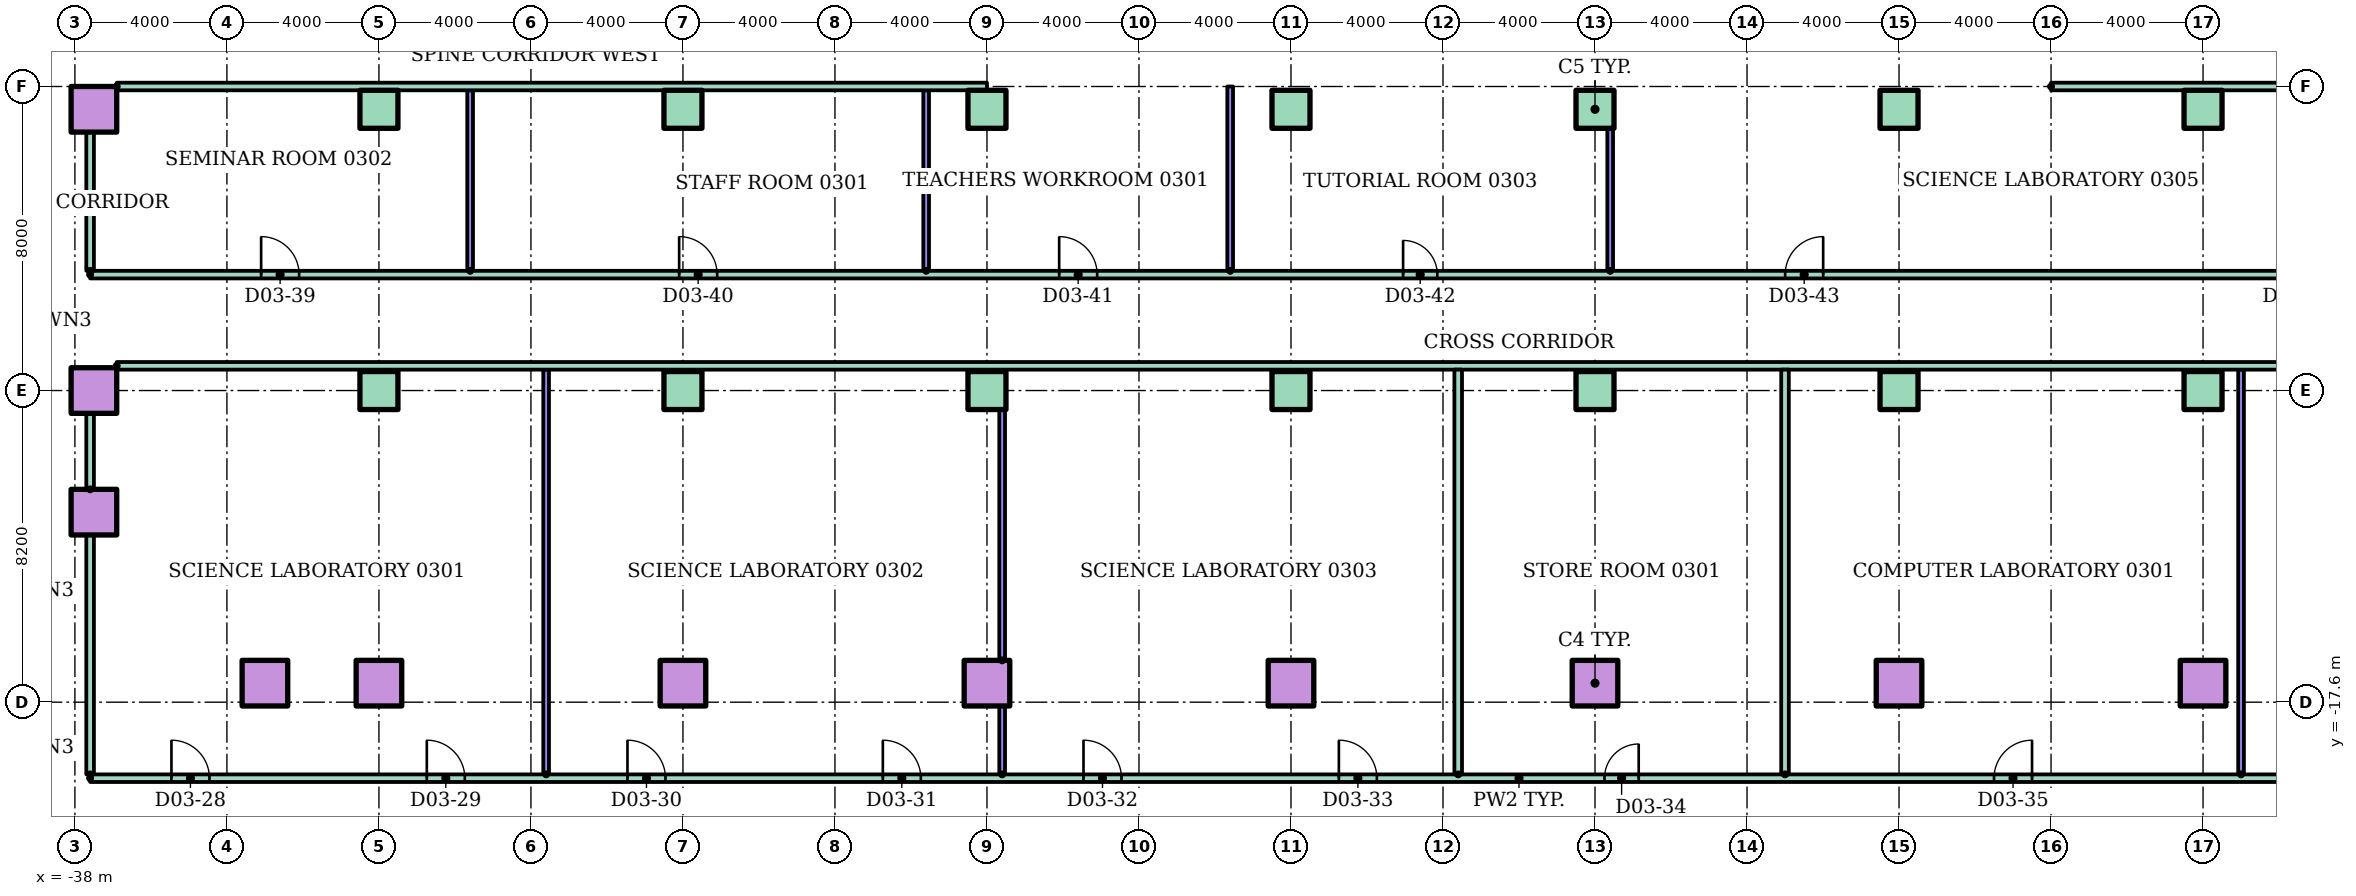
"""IFC4 building model, lengths in metres.
Left out: names, types, materials, properties, quantities, classifications, styles, units other than length and angle.
Written with IfcOpenShell. Run it as: python <this file> out.ifc"""

import sys

from ifc_helpers import new_model, si_unit, direction, frame, frame_2d, origin, origin_2d, place, context, subcontext, project, spatial, rectangle, hollow_rectangle, extrude, element, fill, save


model = new_model("IFC4")
c1 = context("Model", 3, precision=1e-05, world=origin(), true_north=direction((0.0, 1.0)))
c2 = subcontext(c1, "Body", "Model", "MODEL_VIEW")
j1 = project(units=[si_unit("LENGTHUNIT", "METRE"), si_unit("PLANEANGLEUNIT", "RADIAN")], contexts=[c1])
p1 = place(None, origin())
s1 = spatial("IfcSite", under=j1, at=p1, CompositionType="ELEMENT")
p2 = place(p1, origin())
s2 = spatial("IfcBuilding", under=s1, at=p2, CompositionType="ELEMENT")
p3 = place(p2, frame((0.0, 0.0, 14.0)))
s3 = spatial("IfcBuildingStorey", under=s2, at=p3, CompositionType="ELEMENT", Elevation=14.0)
for number, where in (
    (1, (-33.0, -17.1, 0.0)),
    (2, (-30.0, -17.1, 0.0)),
    (3, (-22.0, -17.1, 0.0)),
    (4, (-14.0, -17.1, 0.0)),
    (5, (-6.0, -17.1, 0.0)),
    (6, (2.0, -17.1, 0.0)),
    (7, (10.0, -17.1, 0.0)),
    (8, (18.0, -17.1, 0.0)),
    (9, (-37.5, -12.6, 0.0)),
    (10, (-37.5, -9.4, 0.0)),
):
    element("IfcColumn", number, at=place(p3, frame(where)), inside=s3, PredefinedType="COLUMN", context=c2, shape_type="SweptSolid", body=[
        extrude(hollow_rectangle(XDim=1.2, YDim=1.2, WallThickness=0.06, at=origin_2d()), origin(), (0.0, 0.0, 1.0), 4.0),
    ])
for number, where in (
    (11, (-30.0, -9.4, 0.0)),
    (12, (-22.0, -9.4, 0.0)),
    (13, (-14.0, -9.4, 0.0)),
    (14, (-6.0, -9.4, 0.0)),
    (15, (2.0, -9.4, 0.0)),
    (16, (10.0, -9.4, 0.0)),
    (17, (18.0, -9.4, 0.0)),
):
    element("IfcColumn", number, at=place(p3, frame(where)), inside=s3, PredefinedType="COLUMN", context=c2, shape_type="SweptSolid", body=[
        extrude(rectangle(XDim=1.0, YDim=1.0, at=origin_2d()), origin(), (0.0, 0.0, 1.0), 4.0),
    ])
p4 = place(p3, frame((-37.5, -2.0, 0.0)))
e18 = element("IfcColumn", 18, at=p4, inside=s3, PredefinedType="COLUMN", context=c2, shape_type="SweptSolid", body=[
    extrude(hollow_rectangle(XDim=1.2, YDim=1.2, WallThickness=0.06, at=origin_2d()), origin(), (0.0, 0.0, 1.0), 4.0),
])
for number, where in (
    (19, (-30.0, -2.0, 0.0)),
    (20, (-22.0, -2.0, 0.0)),
    (21, (-14.0, -2.0, 0.0)),
    (22, (-6.0, -2.0, 0.0)),
    (23, (2.0, -2.0, 0.0)),
    (24, (10.0, -2.0, 0.0)),
    (25, (18.0, -2.0, 0.0)),
):
    element("IfcColumn", number, at=place(p3, frame(where)), inside=s3, PredefinedType="COLUMN", context=c2, shape_type="SweptSolid", body=[
        extrude(rectangle(XDim=1.0, YDim=1.0, at=origin_2d()), origin(), (0.0, 0.0, 1.0), 4.0),
    ])
p5 = place(p3, frame((-37.6, -19.6, 0.0)))
e26 = element("IfcWall", 26, at=p5, inside=s3, PredefinedType="PARTITIONING", context=c2, shape_type="SweptSolid", body=[
    extrude(rectangle(XDim=75.2, YDim=0.2, at=frame_2d((37.6, 0.0))), origin(), (0.0, 0.0, 1.0), 3.7),
])
p6 = place(p5, frame((2.14, 0.0, 0.0)))
e27 = element("IfcOpeningElement", 27, at=p6, cuts=e26, PredefinedType="OPENING", context=c2, shape_type="SweptSolid", body=[
    extrude(rectangle(XDim=1.0, YDim=2.1, at=frame_2d((0.5, 1.05))), frame((0.0, 0.11, 0.0), z_axis=(0.0, -1.0, 0.0), x_axis=(1.0, 0.0, 0.0)), (0.0, 0.0, 1.0), 0.22),
])
p7 = place(p5, frame((8.86, 0.0, 0.0)))
e28 = element("IfcOpeningElement", 28, at=p7, cuts=e26, PredefinedType="OPENING", context=c2, shape_type="SweptSolid", body=[
    extrude(rectangle(XDim=1.0, YDim=2.1, at=frame_2d((0.5, 1.05))), frame((0.0, 0.11, 0.0), z_axis=(0.0, -1.0, 0.0), x_axis=(1.0, 0.0, 0.0)), (0.0, 0.0, 1.0), 0.22),
])
p8 = place(p5, frame((14.14, 0.0, 0.0)))
e29 = element("IfcOpeningElement", 29, at=p8, cuts=e26, PredefinedType="OPENING", context=c2, shape_type="SweptSolid", body=[
    extrude(rectangle(XDim=1.0, YDim=2.1, at=frame_2d((0.5, 1.05))), frame((0.0, 0.11, 0.0), z_axis=(0.0, -1.0, 0.0), x_axis=(1.0, 0.0, 0.0)), (0.0, 0.0, 1.0), 0.22),
])
p9 = place(p5, frame((20.86, 0.0, 0.0)))
e30 = element("IfcOpeningElement", 30, at=p9, cuts=e26, PredefinedType="OPENING", context=c2, shape_type="SweptSolid", body=[
    extrude(rectangle(XDim=1.0, YDim=2.1, at=frame_2d((0.5, 1.05))), frame((0.0, 0.11, 0.0), z_axis=(0.0, -1.0, 0.0), x_axis=(1.0, 0.0, 0.0)), (0.0, 0.0, 1.0), 0.22),
])
p10 = place(p5, frame((26.14, 0.0, 0.0)))
e31 = element("IfcOpeningElement", 31, at=p10, cuts=e26, PredefinedType="OPENING", context=c2, shape_type="SweptSolid", body=[
    extrude(rectangle(XDim=1.0, YDim=2.1, at=frame_2d((0.5, 1.05))), frame((0.0, 0.11, 0.0), z_axis=(0.0, -1.0, 0.0), x_axis=(1.0, 0.0, 0.0)), (0.0, 0.0, 1.0), 0.22),
])
p11 = place(p5, frame((32.86, 0.0, 0.0)))
e32 = element("IfcOpeningElement", 32, at=p11, cuts=e26, PredefinedType="OPENING", context=c2, shape_type="SweptSolid", body=[
    extrude(rectangle(XDim=1.0, YDim=2.1, at=frame_2d((0.5, 1.05))), frame((0.0, 0.11, 0.0), z_axis=(0.0, -1.0, 0.0), x_axis=(1.0, 0.0, 0.0)), (0.0, 0.0, 1.0), 0.22),
])
p12 = place(p5, frame((39.85, 0.0, 0.0)))
e33 = element("IfcOpeningElement", 33, at=p12, cuts=e26, PredefinedType="OPENING", context=c2, shape_type="SweptSolid", body=[
    extrude(rectangle(XDim=0.9, YDim=2.1, at=frame_2d((0.45, 1.05))), frame((0.0, 0.11, 0.0), z_axis=(0.0, -1.0, 0.0), x_axis=(1.0, 0.0, 0.0)), (0.0, 0.0, 1.0), 0.22),
])
p13 = place(p5, frame((50.1, 0.0, 0.0)))
e34 = element("IfcOpeningElement", 34, at=p13, cuts=e26, PredefinedType="OPENING", context=c2, shape_type="SweptSolid", body=[
    extrude(rectangle(XDim=1.0, YDim=2.1, at=frame_2d((0.5, 1.05))), frame((0.0, 0.11, 0.0), z_axis=(0.0, -1.0, 0.0), x_axis=(1.0, 0.0, 0.0)), (0.0, 0.0, 1.0), 0.22),
])
p14 = place(p5, frame((61.1, 0.0, 0.0)))
e35 = element("IfcOpeningElement", 35, at=p14, cuts=e26, PredefinedType="OPENING", context=c2, shape_type="SweptSolid", body=[
    extrude(rectangle(XDim=1.0, YDim=2.1, at=frame_2d((0.5, 1.05))), frame((0.0, 0.11, 0.0), z_axis=(0.0, -1.0, 0.0), x_axis=(1.0, 0.0, 0.0)), (0.0, 0.0, 1.0), 0.22),
])
p15 = place(p3, frame((-36.9, -8.75, 0.0)))
e36 = element("IfcWall", 36, at=p15, inside=s3, PredefinedType="PARTITIONING", context=c2, shape_type="SweptSolid", body=[
    extrude(rectangle(XDim=73.8, YDim=0.2, at=frame_2d((36.9, 0.0))), origin(), (0.0, 0.0, 1.0), 3.7),
])
p16 = place(p3, frame((-37.6, -6.35, 0.0)))
e37 = element("IfcWall", 37, at=p16, inside=s3, PredefinedType="PARTITIONING", context=c2, shape_type="SweptSolid", body=[
    extrude(rectangle(XDim=75.2, YDim=0.2, at=frame_2d((37.6, 0.0))), origin(), (0.0, 0.0, 1.0), 3.7),
])
p17 = place(p16, frame((4.5, 0.0, 0.0)))
e38 = element("IfcOpeningElement", 38, at=p17, cuts=e37, PredefinedType="OPENING", context=c2, shape_type="SweptSolid", body=[
    extrude(rectangle(XDim=1.0, YDim=2.1, at=frame_2d((0.5, 1.05))), frame((0.0, 0.11, 0.0), z_axis=(0.0, -1.0, 0.0), x_axis=(1.0, 0.0, 0.0)), (0.0, 0.0, 1.0), 0.22),
])
p18 = place(p16, frame((15.5, 0.0, 0.0)))
e39 = element("IfcOpeningElement", 39, at=p18, cuts=e37, PredefinedType="OPENING", context=c2, shape_type="SweptSolid", body=[
    extrude(rectangle(XDim=1.0, YDim=2.1, at=frame_2d((0.5, 1.05))), frame((0.0, 0.11, 0.0), z_axis=(0.0, -1.0, 0.0), x_axis=(1.0, 0.0, 0.0)), (0.0, 0.0, 1.0), 0.22),
])
p19 = place(p16, frame((25.5, 0.0, 0.0)))
e40 = element("IfcOpeningElement", 40, at=p19, cuts=e37, PredefinedType="OPENING", context=c2, shape_type="SweptSolid", body=[
    extrude(rectangle(XDim=1.0, YDim=2.1, at=frame_2d((0.5, 1.05))), frame((0.0, 0.11, 0.0), z_axis=(0.0, -1.0, 0.0), x_axis=(1.0, 0.0, 0.0)), (0.0, 0.0, 1.0), 0.22),
])
p20 = place(p16, frame((34.55, 0.0, 0.0)))
e41 = element("IfcOpeningElement", 41, at=p20, cuts=e37, PredefinedType="OPENING", context=c2, shape_type="SweptSolid", body=[
    extrude(rectangle(XDim=0.9, YDim=2.1, at=frame_2d((0.45, 1.05))), frame((0.0, 0.11, 0.0), z_axis=(0.0, -1.0, 0.0), x_axis=(1.0, 0.0, 0.0)), (0.0, 0.0, 1.0), 0.22),
])
p21 = place(p16, frame((44.604, 0.0, 0.0)))
e42 = element("IfcOpeningElement", 42, at=p21, cuts=e37, PredefinedType="OPENING", context=c2, shape_type="SweptSolid", body=[
    extrude(rectangle(XDim=1.0, YDim=2.1, at=frame_2d((0.5, 1.05))), frame((0.0, 0.11, 0.0), z_axis=(0.0, -1.0, 0.0), x_axis=(1.0, 0.0, 0.0)), (0.0, 0.0, 1.0), 0.22),
])
p22 = place(p16, frame((57.596, 0.0, 0.0)))
e43 = element("IfcOpeningElement", 43, at=p22, cuts=e37, PredefinedType="OPENING", context=c2, shape_type="SweptSolid", body=[
    extrude(rectangle(XDim=1.0, YDim=2.1, at=frame_2d((0.5, 1.05))), frame((0.0, 0.11, 0.0), z_axis=(0.0, -1.0, 0.0), x_axis=(1.0, 0.0, 0.0)), (0.0, 0.0, 1.0), 0.22),
])
p23 = place(p16, frame((68.7, 0.0, 0.0)))
e44 = element("IfcOpeningElement", 44, at=p23, cuts=e37, PredefinedType="OPENING", context=c2, shape_type="SweptSolid", body=[
    extrude(rectangle(XDim=1.0, YDim=2.1, at=frame_2d((0.5, 1.05))), frame((0.0, 0.11, 0.0), z_axis=(0.0, -1.0, 0.0), x_axis=(1.0, 0.0, 0.0)), (0.0, 0.0, 1.0), 0.22),
])
for number, where in (
    (45, (-36.9, -1.4, 0.0)),
    (46, (14.0, -1.4, 0.0)),
):
    element("IfcWall", number, at=place(p3, frame(where)), inside=s3, PredefinedType="PARTITIONING", context=c2, shape_type="SweptSolid", body=[
        extrude(rectangle(XDim=22.9, YDim=0.2, at=frame_2d((11.45, 0.0))), origin(), (0.0, 0.0, 1.0), 3.7),
    ])
p24 = place(p3, frame((-37.6, -19.5, 0.0), z_axis=(0.0, 0.0, 1.0), x_axis=(0.0, 1.0, 0.0)))
e47 = element("IfcWall", 47, at=p24, inside=s3, PredefinedType="PARTITIONING", context=c2, shape_type="SweptSolid", body=[
    extrude(rectangle(XDim=6.3, YDim=0.2, at=frame_2d((3.15, 0.0))), origin(), (0.0, 0.0, 1.0), 3.7),
])
p25 = place(p3, frame((-37.6, -12.0, 0.0), z_axis=(0.0, 0.0, 1.0), x_axis=(0.0, 1.0, 0.0)))
e48 = element("IfcWall", 48, at=p25, inside=s3, PredefinedType="PARTITIONING", context=c2, shape_type="SweptSolid", body=[
    extrude(rectangle(XDim=2.0, YDim=0.2, at=frame_2d((1.0, 0.0))), origin(), (0.0, 0.0, 1.0), 3.7),
])
p26 = place(p3, frame((-37.6, -6.25, 0.0), z_axis=(0.0, 0.0, 1.0), x_axis=(0.0, 1.0, 0.0)))
e49 = element("IfcWall", 49, at=p26, inside=s3, PredefinedType="PARTITIONING", context=c2, shape_type="SweptSolid", body=[
    extrude(rectangle(XDim=3.65, YDim=0.2, at=frame_2d((1.825, 0.0))), origin(), (0.0, 0.0, 1.0), 3.7),
])
p27 = place(p3, frame((-27.6, -6.25, 0.0), z_axis=(0.0, 0.0, 1.0), x_axis=(0.0, 1.0, 0.0)))
e50 = element("IfcWall", 50, at=p27, inside=s3, PredefinedType="PARTITIONING", context=c2, shape_type="SweptSolid", body=[
    extrude(rectangle(XDim=4.75, YDim=0.15, at=frame_2d((2.375, 0.0))), origin(), (0.0, 0.0, 1.0), 3.7),
])
p28 = place(p3, frame((-25.6, -19.5, 0.0), z_axis=(0.0, 0.0, 1.0), x_axis=(0.0, 1.0, 0.0)))
e51 = element("IfcWall", 51, at=p28, inside=s3, PredefinedType="PARTITIONING", context=c2, shape_type="SweptSolid", body=[
    extrude(rectangle(XDim=10.65, YDim=0.15, at=frame_2d((5.325, 0.0))), origin(), (0.0, 0.0, 1.0), 3.7),
])
p29 = place(p3, frame((-15.6, -6.25, 0.0), z_axis=(0.0, 0.0, 1.0), x_axis=(0.0, 1.0, 0.0)))
e52 = element("IfcWall", 52, at=p29, inside=s3, PredefinedType="PARTITIONING", context=c2, shape_type="SweptSolid", body=[
    extrude(rectangle(XDim=4.75, YDim=0.15, at=frame_2d((2.375, 0.0))), origin(), (0.0, 0.0, 1.0), 3.7),
])
p30 = place(p3, frame((-13.6, -19.5, 0.0), z_axis=(0.0, 0.0, 1.0), x_axis=(0.0, 1.0, 0.0)))
e53 = element("IfcWall", 53, at=p30, inside=s3, PredefinedType="PARTITIONING", context=c2, shape_type="SweptSolid", body=[
    extrude(rectangle(XDim=1.8, YDim=0.15, at=frame_2d((0.9, 0.0))), origin(), (0.0, 0.0, 1.0), 3.7),
])
p31 = place(p3, frame((-13.6, -16.5, 0.0), z_axis=(0.0, 0.0, 1.0), x_axis=(0.0, 1.0, 0.0)))
e54 = element("IfcWall", 54, at=p31, inside=s3, PredefinedType="PARTITIONING", context=c2, shape_type="SweptSolid", body=[
    extrude(rectangle(XDim=6.6, YDim=0.15, at=frame_2d((3.3, 0.0))), origin(), (0.0, 0.0, 1.0), 3.7),
])
p32 = place(p3, frame((-7.6, -6.25, 0.0), z_axis=(0.0, 0.0, 1.0), x_axis=(0.0, 1.0, 0.0)))
e55 = element("IfcWall", 55, at=p32, inside=s3, PredefinedType="PARTITIONING", context=c2, shape_type="SweptSolid", body=[
    extrude(rectangle(XDim=4.85, YDim=0.15, at=frame_2d((2.425, 0.0))), origin(), (0.0, 0.0, 1.0), 3.7),
])
p33 = place(p3, frame((-1.6, -19.5, 0.0), z_axis=(0.0, 0.0, 1.0), x_axis=(0.0, 1.0, 0.0)))
e56 = element("IfcWall", 56, at=p33, inside=s3, PredefinedType="PARTITIONING", context=c2, shape_type="SweptSolid", body=[
    extrude(rectangle(XDim=10.65, YDim=0.2, at=frame_2d((5.325, 0.0))), origin(), (0.0, 0.0, 1.0), 3.7),
])
p34 = place(p3, frame((2.4, -6.25, 0.0), z_axis=(0.0, 0.0, 1.0), x_axis=(0.0, 1.0, 0.0)))
e57 = element("IfcWall", 57, at=p34, inside=s3, PredefinedType="PARTITIONING", context=c2, shape_type="SweptSolid", body=[
    extrude(rectangle(XDim=3.75, YDim=0.15, at=frame_2d((1.875, 0.0))), origin(), (0.0, 0.0, 1.0), 3.7),
])
p35 = place(p3, frame((7.0, -19.5, 0.0), z_axis=(0.0, 0.0, 1.0), x_axis=(0.0, 1.0, 0.0)))
e58 = element("IfcWall", 58, at=p35, inside=s3, PredefinedType="PARTITIONING", context=c2, shape_type="SweptSolid", body=[
    extrude(rectangle(XDim=10.65, YDim=0.2, at=frame_2d((5.325, 0.0))), origin(), (0.0, 0.0, 1.0), 3.7),
])
p36 = place(p3, frame((19.0, -19.5, 0.0), z_axis=(0.0, 0.0, 1.0), x_axis=(0.0, 1.0, 0.0)))
e59 = element("IfcWall", 59, at=p36, inside=s3, PredefinedType="PARTITIONING", context=c2, shape_type="SweptSolid", body=[
    extrude(rectangle(XDim=10.65, YDim=0.15, at=frame_2d((5.325, 0.0))), origin(), (0.0, 0.0, 1.0), 3.7),
])
p37 = place(p6, origin())
e60 = element("IfcDoor", 60, at=p37, inside=s3, OperationType="SINGLE_SWING_LEFT", PredefinedType="DOOR", context=c2, shape_type="SweptSolid", body=[
    extrude(rectangle(XDim=1.0, YDim=2.1, at=frame_2d((0.5, 1.05))), frame((0.0, 0.025, 0.0), z_axis=(0.0, -1.0, 0.0), x_axis=(1.0, 0.0, 0.0)), (0.0, 0.0, 1.0), 0.05),
])
fill(e27, e60)
p38 = place(p7, origin())
e61 = element("IfcDoor", 61, at=p38, inside=s3, OperationType="SINGLE_SWING_LEFT", PredefinedType="DOOR", context=c2, shape_type="SweptSolid", body=[
    extrude(rectangle(XDim=1.0, YDim=2.1, at=frame_2d((0.5, 1.05))), frame((0.0, 0.025, 0.0), z_axis=(0.0, -1.0, 0.0), x_axis=(1.0, 0.0, 0.0)), (0.0, 0.0, 1.0), 0.05),
])
fill(e28, e61)
p39 = place(p8, origin())
e62 = element("IfcDoor", 62, at=p39, inside=s3, OperationType="SINGLE_SWING_LEFT", PredefinedType="DOOR", context=c2, shape_type="SweptSolid", body=[
    extrude(rectangle(XDim=1.0, YDim=2.1, at=frame_2d((0.5, 1.05))), frame((0.0, 0.025, 0.0), z_axis=(0.0, -1.0, 0.0), x_axis=(1.0, 0.0, 0.0)), (0.0, 0.0, 1.0), 0.05),
])
fill(e29, e62)
p40 = place(p9, origin())
e63 = element("IfcDoor", 63, at=p40, inside=s3, OperationType="SINGLE_SWING_LEFT", PredefinedType="DOOR", context=c2, shape_type="SweptSolid", body=[
    extrude(rectangle(XDim=1.0, YDim=2.1, at=frame_2d((0.5, 1.05))), frame((0.0, 0.025, 0.0), z_axis=(0.0, -1.0, 0.0), x_axis=(1.0, 0.0, 0.0)), (0.0, 0.0, 1.0), 0.05),
])
fill(e30, e63)
p41 = place(p10, origin())
e64 = element("IfcDoor", 64, at=p41, inside=s3, OperationType="SINGLE_SWING_LEFT", PredefinedType="DOOR", context=c2, shape_type="SweptSolid", body=[
    extrude(rectangle(XDim=1.0, YDim=2.1, at=frame_2d((0.5, 1.05))), frame((0.0, 0.025, 0.0), z_axis=(0.0, -1.0, 0.0), x_axis=(1.0, 0.0, 0.0)), (0.0, 0.0, 1.0), 0.05),
])
fill(e31, e64)
p42 = place(p11, origin())
e65 = element("IfcDoor", 65, at=p42, inside=s3, OperationType="SINGLE_SWING_LEFT", PredefinedType="DOOR", context=c2, shape_type="SweptSolid", body=[
    extrude(rectangle(XDim=1.0, YDim=2.1, at=frame_2d((0.5, 1.05))), frame((0.0, 0.025, 0.0), z_axis=(0.0, -1.0, 0.0), x_axis=(1.0, 0.0, 0.0)), (0.0, 0.0, 1.0), 0.05),
])
fill(e32, e65)
p43 = place(p12, origin())
e66 = element("IfcDoor", 66, at=p43, inside=s3, OperationType="SINGLE_SWING_RIGHT", PredefinedType="DOOR", context=c2, shape_type="SweptSolid", body=[
    extrude(rectangle(XDim=0.9, YDim=2.1, at=frame_2d((0.45, 1.05))), frame((0.0, 0.025, 0.0), z_axis=(0.0, -1.0, 0.0), x_axis=(1.0, 0.0, 0.0)), (0.0, 0.0, 1.0), 0.05),
])
fill(e33, e66)
p44 = place(p13, origin())
e67 = element("IfcDoor", 67, at=p44, inside=s3, OperationType="SINGLE_SWING_RIGHT", PredefinedType="DOOR", context=c2, shape_type="SweptSolid", body=[
    extrude(rectangle(XDim=1.0, YDim=2.1, at=frame_2d((0.5, 1.05))), frame((0.0, 0.025, 0.0), z_axis=(0.0, -1.0, 0.0), x_axis=(1.0, 0.0, 0.0)), (0.0, 0.0, 1.0), 0.05),
])
fill(e34, e67)
p45 = place(p17, origin())
e68 = element("IfcDoor", 68, at=p45, inside=s3, OperationType="SINGLE_SWING_LEFT", PredefinedType="DOOR", context=c2, shape_type="SweptSolid", body=[
    extrude(rectangle(XDim=1.0, YDim=2.1, at=frame_2d((0.5, 1.05))), frame((0.0, 0.025, 0.0), z_axis=(0.0, -1.0, 0.0), x_axis=(1.0, 0.0, 0.0)), (0.0, 0.0, 1.0), 0.05),
])
fill(e38, e68)
p46 = place(p18, origin())
e69 = element("IfcDoor", 69, at=p46, inside=s3, OperationType="SINGLE_SWING_LEFT", PredefinedType="DOOR", context=c2, shape_type="SweptSolid", body=[
    extrude(rectangle(XDim=1.0, YDim=2.1, at=frame_2d((0.5, 1.05))), frame((0.0, 0.025, 0.0), z_axis=(0.0, -1.0, 0.0), x_axis=(1.0, 0.0, 0.0)), (0.0, 0.0, 1.0), 0.05),
])
fill(e39, e69)
p47 = place(p19, origin())
e70 = element("IfcDoor", 70, at=p47, inside=s3, OperationType="SINGLE_SWING_LEFT", PredefinedType="DOOR", context=c2, shape_type="SweptSolid", body=[
    extrude(rectangle(XDim=1.0, YDim=2.1, at=frame_2d((0.5, 1.05))), frame((0.0, 0.025, 0.0), z_axis=(0.0, -1.0, 0.0), x_axis=(1.0, 0.0, 0.0)), (0.0, 0.0, 1.0), 0.05),
])
fill(e40, e70)
p48 = place(p20, origin())
e71 = element("IfcDoor", 71, at=p48, inside=s3, OperationType="SINGLE_SWING_LEFT", PredefinedType="DOOR", context=c2, shape_type="SweptSolid", body=[
    extrude(rectangle(XDim=0.9, YDim=2.1, at=frame_2d((0.45, 1.05))), frame((0.0, 0.025, 0.0), z_axis=(0.0, -1.0, 0.0), x_axis=(1.0, 0.0, 0.0)), (0.0, 0.0, 1.0), 0.05),
])
fill(e41, e71)
p49 = place(p21, origin())
e72 = element("IfcDoor", 72, at=p49, inside=s3, OperationType="SINGLE_SWING_RIGHT", PredefinedType="DOOR", context=c2, shape_type="SweptSolid", body=[
    extrude(rectangle(XDim=1.0, YDim=2.1, at=frame_2d((0.5, 1.05))), frame((0.0, 0.025, 0.0), z_axis=(0.0, -1.0, 0.0), x_axis=(1.0, 0.0, 0.0)), (0.0, 0.0, 1.0), 0.05),
])
fill(e42, e72)
save(model, sys.argv[1])
